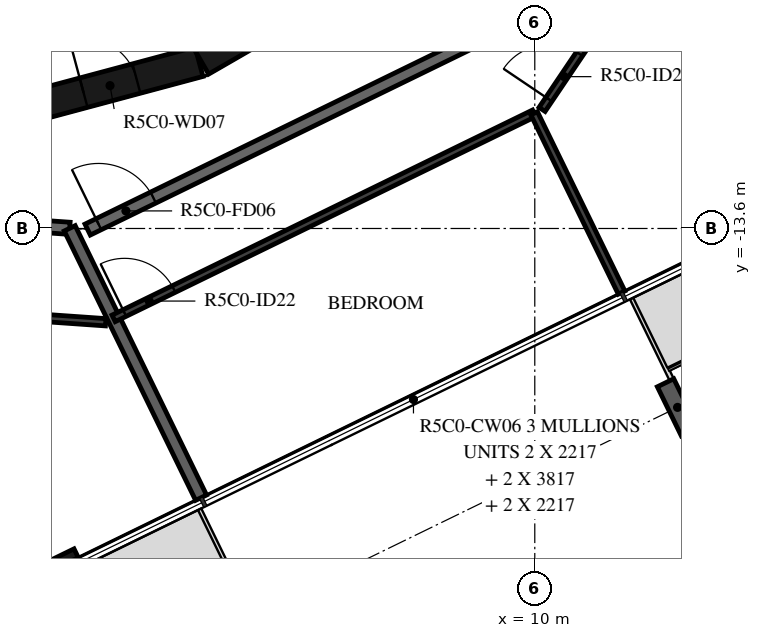
"""IFC4 building model, lengths in metres.
Left out: names, types, materials, properties, quantities, classifications, styles, units other than length and angle.
Written with IfcOpenShell. Run it as: python <this file> out.ifc"""

import sys

from ifc_helpers import new_model, si_unit, direction, frame, frame_2d, origin, origin_2d, place, context, subcontext, project, spatial, rectangle, i_section, extrude, element, fill, save


model = new_model("IFC4")
c1 = context("Model", 3, precision=1e-05, world=origin(), true_north=direction((0.0, 1.0)))
c2 = subcontext(c1, "Body", "Model", "MODEL_VIEW")
j1 = project(units=[si_unit("LENGTHUNIT", "METRE"), si_unit("PLANEANGLEUNIT", "RADIAN")], contexts=[c1])
p1 = place(None, origin())
s1 = spatial("IfcSite", under=j1, at=p1, CompositionType="ELEMENT")
p2 = place(p1, origin())
s2 = spatial("IfcBuilding", under=s1, at=p2, CompositionType="ELEMENT")
p3 = place(p2, frame((0.0, 0.0, 216.4)))
s3 = spatial("IfcBuildingStorey", under=s2, at=p3, CompositionType="ELEMENT", Elevation=216.4)
p4 = place(p3, frame((12.348, -16.542, -0.38), z_axis=(0.0, 0.0, 1.0), x_axis=(-0.898794095235, -0.438371046456, 0.0)))
e1 = element("IfcColumn", 1, at=p4, inside=s3, PredefinedType="COLUMN", context=c2, shape_type="SweptSolid", body=[
    extrude(i_section(OverallWidth=0.3, OverallDepth=0.9, WebThickness=0.019, FlangeThickness=0.035, FilletRadius=0.03, at=origin_2d()), origin(), (0.0, 0.0, 1.0), 2.616),
])
p5 = place(p3, frame((-0.418, -20.343, 0.0), z_axis=(0.0, 0.0, 1.0), x_axis=(0.898778711213, 0.43840258698, 0.0)))
e2 = element("IfcWall", 2, at=p5, inside=s3, PredefinedType="STANDARD", context=c2, shape_type="SweptSolid", body=[
    extrude(rectangle(XDim=3.2, YDim=0.16, at=frame_2d((1.6, 0.0))), origin(), (0.0, 0.0, 1.0), 3.05),
])
p6 = place(p5, frame((0.4, 0.0, 0.0)))
e3 = element("IfcOpeningElement", 3, at=p6, cuts=e2, PredefinedType="OPENING", context=c2, shape_type="SweptSolid", body=[
    extrude(rectangle(XDim=2.4, YDim=2.4, at=frame_2d((1.2, 1.2))), frame((0.0, 0.09, 0.0), z_axis=(0.0, -1.0, 0.0), x_axis=(1.0, 0.0, 0.0)), (0.0, 0.0, 1.0), 0.18),
])
p7 = place(p3, frame((1.55, -11.643, 0.0), z_axis=(0.0, 0.0, 1.0), x_axis=(0.965948410781, 0.258734743916, 0.0)))
e4 = element("IfcWall", 4, at=p7, inside=s3, PredefinedType="SHEAR", context=c2, shape_type="SweptSolid", body=[
    extrude(rectangle(XDim=3.033, YDim=0.5, at=frame_2d((1.516, 0.0))), origin(), (0.0, 0.0, 1.0), 3.05),
])
p8 = place(p7, frame((1.066, 0.0, 0.0)))
e5 = element("IfcOpeningElement", 5, at=p8, cuts=e4, PredefinedType="OPENING", context=c2, shape_type="SweptSolid", body=[
    extrude(rectangle(XDim=0.9, YDim=2.1, at=frame_2d((0.45, 1.05))), frame((0.0, 0.26, 0.0), z_axis=(0.0, -1.0, 0.0), x_axis=(1.0, 0.0, 0.0)), (0.0, 0.0, 1.0), 0.52),
])
p9 = place(p3, frame((4.51, -10.845, 0.0), z_axis=(0.0, 0.0, 1.0), x_axis=(0.865975092491, 0.500087131594, 0.0)))
e6 = element("IfcWall", 6, at=p9, inside=s3, PredefinedType="SHEAR", context=c2, shape_type="SweptSolid", body=[
    extrude(rectangle(XDim=3.033, YDim=0.5, at=frame_2d((1.516, 0.0))), origin(), (0.0, 0.0, 1.0), 3.05),
])
p10 = place(p9, frame((1.066, 0.0, 0.0)))
e7 = element("IfcOpeningElement", 7, at=p10, cuts=e6, PredefinedType="OPENING", context=c2, shape_type="SweptSolid", body=[
    extrude(rectangle(XDim=0.9, YDim=2.1, at=frame_2d((0.45, 1.05))), frame((0.0, 0.26, 0.0), z_axis=(0.0, -1.0, 0.0), x_axis=(1.0, 0.0, 0.0)), (0.0, 0.0, 1.0), 0.52),
])
p11 = place(p3, frame((3.367, -9.007, 0.0), z_axis=(0.0, 0.0, 1.0), x_axis=(0.394387482265, -0.918944238696, 0.0)))
e8 = element("IfcWall", 8, at=p11, inside=s3, PredefinedType="PARTITIONING", context=c2, shape_type="SweptSolid", body=[
    extrude(rectangle(XDim=1.825, YDim=0.15, at=frame_2d((0.913, 0.0))), origin(), (0.0, 0.0, 1.0), 3.05),
])
p12 = place(p3, frame((-4.517, -13.117, 0.0), z_axis=(0.0, 0.0, 1.0), x_axis=(0.997564669554, -0.069747616856, 0.0)))
e9 = element("IfcWall", 9, at=p12, inside=s3, PredefinedType="STANDARD", context=c2, shape_type="SweptSolid", body=[
    extrude(rectangle(XDim=6.885, YDim=0.2, at=frame_2d((3.443, 0.0))), origin(), (0.0, 0.0, 1.0), 3.05),
])
p13 = place(p12, frame((3.2, 0.0, 0.0)))
e10 = element("IfcOpeningElement", 10, at=p13, cuts=e9, PredefinedType="OPENING", context=c2, shape_type="SweptSolid", body=[
    extrude(rectangle(XDim=1.0, YDim=2.1, at=frame_2d((0.5, 1.05))), frame((0.0, 0.11, 0.0), z_axis=(0.0, -1.0, 0.0), x_axis=(1.0, 0.0, 0.0)), (0.0, 0.0, 1.0), 0.22),
])
p14 = place(p3, frame((2.647, -13.618, 0.0), z_axis=(0.0, 0.0, 1.0), x_axis=(0.898796543751, 0.438366026218, 0.0)))
e11 = element("IfcWall", 11, at=p14, inside=s3, PredefinedType="STANDARD", context=c2, shape_type="SweptSolid", body=[
    extrude(rectangle(XDim=7.181, YDim=0.2, at=frame_2d((3.591, 0.0))), origin(), (0.0, 0.0, 1.0), 3.05),
])
p15 = place(p14, frame((0.2, 0.0, 0.0)))
e12 = element("IfcOpeningElement", 12, at=p15, cuts=e11, PredefinedType="OPENING", context=c2, shape_type="SweptSolid", body=[
    extrude(rectangle(XDim=1.0, YDim=2.1, at=frame_2d((0.5, 1.05))), frame((0.0, 0.11, 0.0), z_axis=(0.0, -1.0, 0.0), x_axis=(1.0, 0.0, 0.0)), (0.0, 0.0, 1.0), 0.22),
])
p16 = place(p3, frame((4.512, -18.027, 0.0), z_axis=(0.0, 0.0, 1.0), x_axis=(-0.438374835386, 0.898792247241, 0.0)))
e13 = element("IfcWall", 13, at=p16, inside=s3, PredefinedType="STANDARD", context=c2, shape_type="SweptSolid", body=[
    extrude(rectangle(XDim=4.929, YDim=0.2, at=frame_2d((2.464, 0.0))), origin(), (0.0, 0.0, 1.0), 3.05),
])
p17 = place(p3, frame((-4.309, -14.635, 0.0), z_axis=(0.0, 0.0, 1.0), x_axis=(0.997564788147, -0.069745920658, 0.0)))
e14 = element("IfcWall", 14, at=p17, inside=s3, PredefinedType="PARTITIONING", context=c2, shape_type="SweptSolid", body=[
    extrude(rectangle(XDim=7.271, YDim=0.12, at=frame_2d((3.635, 0.0))), origin(), (0.0, 0.0, 1.0), 3.05),
])
p18 = place(p17, frame((3.632, 0.0, 0.0)))
e15 = element("IfcOpeningElement", 15, at=p18, cuts=e14, PredefinedType="OPENING", context=c2, shape_type="SweptSolid", body=[
    extrude(rectangle(XDim=0.9, YDim=2.1, at=frame_2d((0.45, 1.05))), frame((0.0, 0.07, 0.0), z_axis=(0.0, -1.0, 0.0), x_axis=(1.0, 0.0, 0.0)), (0.0, 0.0, 1.0), 0.14),
])
p19 = place(p3, frame((3.074, -15.078, 0.0), z_axis=(0.0, 0.0, 1.0), x_axis=(0.898800770739, 0.438357359377, 0.0)))
e16 = element("IfcWall", 16, at=p19, inside=s3, PredefinedType="PARTITIONING", context=c2, shape_type="SweptSolid", body=[
    extrude(rectangle(XDim=7.694, YDim=0.12, at=frame_2d((3.847, 0.0))), origin(), (0.0, 0.0, 1.0), 3.05),
])
p20 = place(p19, frame((0.2, 0.0, 0.0)))
e17 = element("IfcOpeningElement", 17, at=p20, cuts=e16, PredefinedType="OPENING", context=c2, shape_type="SweptSolid", body=[
    extrude(rectangle(XDim=0.9, YDim=2.1, at=frame_2d((0.45, 1.05))), frame((0.0, 0.07, 0.0), z_axis=(0.0, -1.0, 0.0), x_axis=(1.0, 0.0, 0.0)), (0.0, 0.0, 1.0), 0.14),
])
p21 = place(p3, frame((10.12, -11.642, 0.0), z_axis=(0.0, 0.0, 1.0), x_axis=(0.559201404667, 0.829031838362, 0.0)))
e18 = element("IfcWall", 18, at=p21, inside=s3, PredefinedType="PARTITIONING", context=c2, shape_type="SweptSolid", body=[
    extrude(rectangle(XDim=7.709, YDim=0.12, at=frame_2d((3.854, 0.0))), origin(), (0.0, 0.0, 1.0), 3.05),
])
p22 = place(p21, frame((0.2, 0.0, 0.0)))
e19 = element("IfcOpeningElement", 19, at=p22, cuts=e18, PredefinedType="OPENING", context=c2, shape_type="SweptSolid", body=[
    extrude(rectangle(XDim=0.9, YDim=2.1, at=frame_2d((0.45, 1.05))), frame((0.0, 0.07, 0.0), z_axis=(0.0, -1.0, 0.0), x_axis=(1.0, 0.0, 0.0)), (0.0, 0.0, 1.0), 0.14),
])
p23 = place(p3, frame((11.427, -14.654, 0.0), z_axis=(0.0, 0.0, 1.0), x_axis=(-0.438410435857, 0.898774882677, 0.0)))
e20 = element("IfcWall", 20, at=p23, inside=s3, PredefinedType="PARTITIONING", context=c2, shape_type="SweptSolid", body=[
    extrude(rectangle(XDim=3.281, YDim=0.12, at=frame_2d((1.64, 0.0))), origin(), (0.0, 0.0, 1.0), 3.05),
])
p24 = place(p8, origin())
e21 = element("IfcDoor", 21, at=p24, inside=s3, OperationType="SINGLE_SWING_LEFT", PredefinedType="DOOR", context=c2, shape_type="SweptSolid", body=[
    extrude(rectangle(XDim=0.9, YDim=2.1, at=frame_2d((0.45, 1.05))), frame((0.0, 0.025, 0.0), z_axis=(0.0, -1.0, 0.0), x_axis=(1.0, 0.0, 0.0)), (0.0, 0.0, 1.0), 0.05),
])
fill(e5, e21)
p25 = place(p15, origin())
e22 = element("IfcDoor", 22, at=p25, inside=s3, OperationType="SINGLE_SWING_LEFT", PredefinedType="DOOR", context=c2, shape_type="SweptSolid", body=[
    extrude(rectangle(XDim=1.0, YDim=2.1, at=frame_2d((0.5, 1.05))), frame((0.0, 0.025, 0.0), z_axis=(0.0, -1.0, 0.0), x_axis=(1.0, 0.0, 0.0)), (0.0, 0.0, 1.0), 0.05),
])
fill(e12, e22)
p26 = place(p20, origin())
e23 = element("IfcDoor", 23, at=p26, inside=s3, OperationType="SINGLE_SWING_LEFT", PredefinedType="DOOR", context=c2, shape_type="SweptSolid", body=[
    extrude(rectangle(XDim=0.9, YDim=2.1, at=frame_2d((0.45, 1.05))), frame((0.0, 0.025, 0.0), z_axis=(0.0, -1.0, 0.0), x_axis=(1.0, 0.0, 0.0)), (0.0, 0.0, 1.0), 0.05),
])
fill(e17, e23)
p27 = place(p22, origin())
e24 = element("IfcDoor", 24, at=p27, inside=s3, OperationType="SINGLE_SWING_RIGHT", PredefinedType="DOOR", context=c2, shape_type="SweptSolid", body=[
    extrude(rectangle(XDim=0.9, YDim=2.1, at=frame_2d((0.45, 1.05))), frame((0.0, 0.025, 0.0), z_axis=(0.0, -1.0, 0.0), x_axis=(1.0, 0.0, 0.0)), (0.0, 0.0, 1.0), 0.05),
])
fill(e19, e24)
save(model, sys.argv[1])
